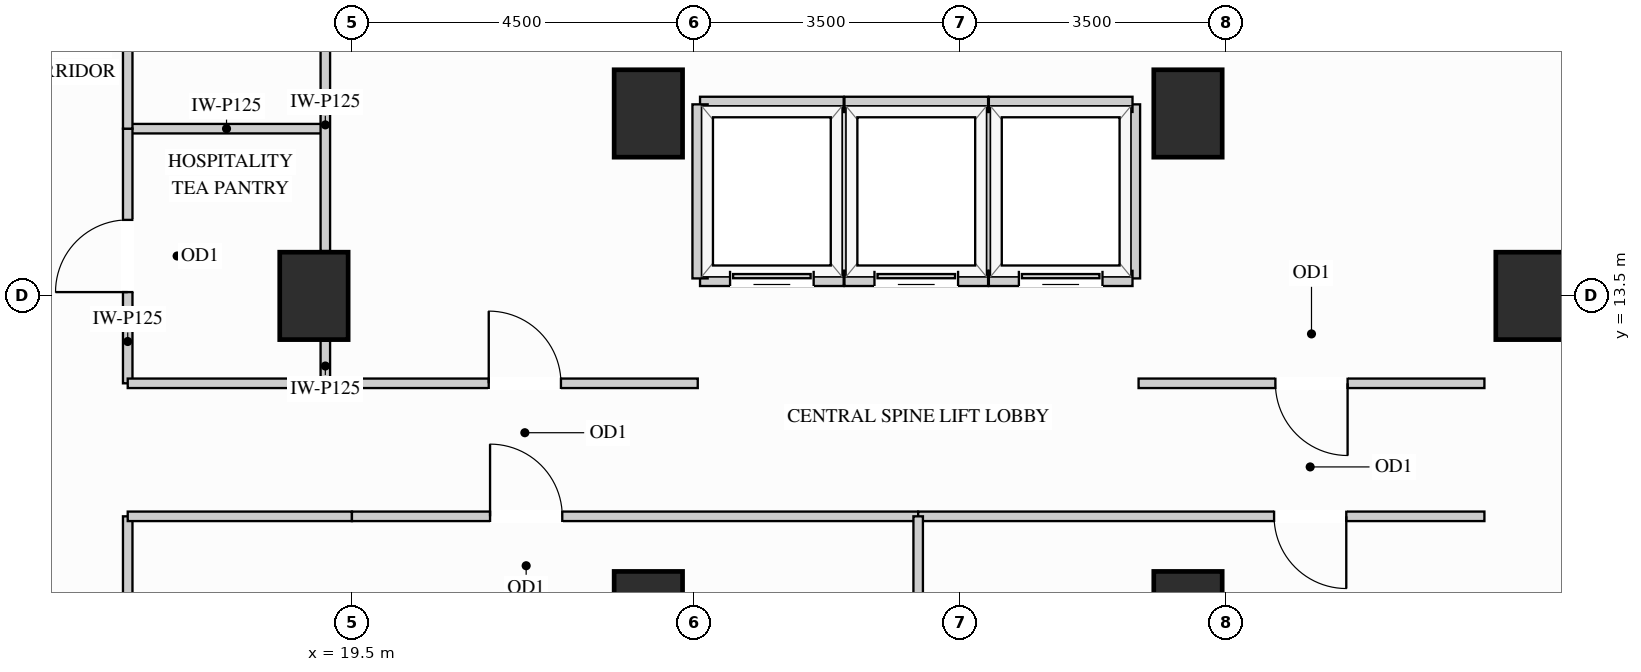
"""IFC4 building model, lengths in metres.
Left out: names, types, materials, properties, quantities, classifications, styles, units other than length and angle.
Written with IfcOpenShell. Run it as: python <this file> out.ifc"""

import sys

from ifc_helpers import new_model, si_unit, direction, frame, frame_2d, origin, origin_2d, place, context, subcontext, project, spatial, rectangle, extrude, source, transform, mapped, element, fill, save


model = new_model("IFC4")
c1 = context("Model", 3, precision=1e-05, world=origin(), true_north=direction((0.0, 1.0)))
c2 = subcontext(c1, "Body", "Model", "MODEL_VIEW")
j1 = project(units=[si_unit("LENGTHUNIT", "METRE"), si_unit("PLANEANGLEUNIT", "RADIAN")], contexts=[c1])
p1 = place(None, origin())
s1 = spatial("IfcSite", under=j1, at=p1, CompositionType="ELEMENT")
p2 = place(p1, origin())
s2 = spatial("IfcBuilding", under=s1, at=p2, CompositionType="ELEMENT")
p3 = place(p2, frame((0.0, 0.0, 99.0)))
s3 = spatial("IfcBuildingStorey", under=s2, at=p3, CompositionType="ELEMENT", Elevation=99.0)
m1 = source(origin(), c2, "Body", "SweptSolid", [
    extrude(rectangle(XDim=0.9, YDim=1.15, at=origin_2d()), origin(), (0.0, 0.0, 1.0), 3.38),
])
for number, where, z_axis, x_axis in (
    (1, (19.0, 13.5, 0.0), (0.0, 0.0, 1.0), (1.0, 0.0, 0.0)),
    (2, (35.0, 13.5, 0.0), (0.0, 0.0, 1.0), (1.0, 0.0, 0.0)),
    (3, (23.4, 15.9, 0.0), (0.0, 0.0, 1.0), (1.0, 0.0, 0.0)),
    (4, (23.4, 9.3, 0.0), (0.0, 0.0, 1.0), (1.0, 0.0, 0.0)),
    (5, (30.5, 15.9, 0.0), (0.0, 0.0, 1.0), (1.0, 0.0, 0.0)),
    (6, (30.5, 9.3, 0.0), (0.0, 0.0, 1.0), (1.0, 0.0, 0.0)),
):
    element("IfcColumn", number, at=place(p3, frame(where, z_axis=z_axis, x_axis=x_axis)), inside=s3, PredefinedType="COLUMN", context=c2, shape_type="MappedRepresentation", body=[
        mapped(m1, transform((0.0, 0.0, 0.0), x_axis=(1.0, 0.0, 0.0), y_axis=(0.0, 1.0, 0.0), z_axis=(0.0, 0.0, 1.0))),
    ])
m2 = source(origin(), c2, "Body", "SweptSolid", [
    extrude(rectangle(XDim=2.6, YDim=0.125, at=frame_2d((1.3, 0.0))), origin(), (0.0, 0.0, 1.0), 3.365),
])
p4 = place(p3, frame((16.55, 15.7, 0.0), z_axis=(0.0, 0.0, 1.0), x_axis=(1.0, 0.0, 0.0)))
e7 = element("IfcWall", 7, at=p4, inside=s3, PredefinedType="PARTITIONING", context=c2, shape_type="MappedRepresentation", body=[
    mapped(m2, transform((0.0, 0.0, 0.0), x_axis=(1.0, 0.0, 0.0), y_axis=(0.0, 1.0, 0.0), z_axis=(0.0, 0.0, 1.0))),
])
m3 = source(origin(), c2, "Body", "SweptSolid", [
    extrude(rectangle(XDim=0.56, YDim=0.125, at=frame_2d((0.28, 0.0))), origin(), (0.0, 0.0, 1.0), 2.677),
])
p5 = place(p3, frame((19.15, 12.35, 0.0), z_axis=(0.0, 0.0, 1.0), x_axis=(0.0, 1.0, 0.0)))
e8 = element("IfcWall", 8, at=p5, inside=s3, PredefinedType="PARTITIONING", context=c2, shape_type="MappedRepresentation", body=[
    mapped(m3, transform((0.0, 0.0, 0.0), x_axis=(1.0, 0.0, 0.0), y_axis=(0.0, 1.0, 0.0), z_axis=(0.0, 0.0, 1.0))),
])
m4 = source(origin(), c2, "Body", "SweptSolid", [
    extrude(rectangle(XDim=3.32, YDim=0.125, at=frame_2d((1.66, 0.0))), origin(), (0.0, 0.0, 1.0), 2.677),
])
p6 = place(p3, frame((19.15, 14.09, 0.0), z_axis=(0.0, 0.0, 1.0), x_axis=(0.0, 1.0, 0.0)))
e9 = element("IfcWall", 9, at=p6, inside=s3, PredefinedType="PARTITIONING", context=c2, shape_type="MappedRepresentation", body=[
    mapped(m4, transform((0.0, 0.0, 0.0), x_axis=(1.0, 0.0, 0.0), y_axis=(0.0, 1.0, 0.0), z_axis=(0.0, 0.0, 1.0))),
])
p7 = place(p3, frame((16.55, 12.35, 0.0), z_axis=(0.0, 0.0, 1.0), x_axis=(0.0, 1.0, 0.0)))
e10 = element("IfcWall", 10, at=p7, inside=s3, PredefinedType="PARTITIONING", context=c2, shape_type="SweptSolid", body=[
    extrude(rectangle(XDim=3.35, YDim=0.125, at=frame_2d((1.675, 0.0))), origin(), (0.0, 0.0, 1.0), 3.365),
])
p8 = place(p7, frame((1.2, 0.0, 0.0)))
e11 = element("IfcOpeningElement", 11, at=p8, cuts=e10, PredefinedType="OPENING", context=c2, shape_type="SweptSolid", body=[
    extrude(rectangle(XDim=0.95, YDim=2.15, at=frame_2d((0.475, 1.075))), frame((0.0, 0.073, 0.0), z_axis=(0.0, -1.0, 0.0), x_axis=(1.0, 0.0, 0.0)), (0.0, 0.0, 1.0), 0.145),
])
p9 = place(p3, frame((16.55, 15.7, 0.0), z_axis=(0.0, 0.0, 1.0), x_axis=(0.0, 1.0, 0.0)))
e12 = element("IfcWall", 12, at=p9, inside=s3, PredefinedType="PARTITIONING", context=c2, shape_type="SweptSolid", body=[
    extrude(rectangle(XDim=7.65, YDim=0.125, at=frame_2d((3.825, 0.0))), origin(), (0.0, 0.0, 1.0), 3.365),
])
p10 = place(p9, frame((3.35, 0.0, 0.0)))
e13 = element("IfcOpeningElement", 13, at=p10, cuts=e12, PredefinedType="OPENING", context=c2, shape_type="SweptSolid", body=[
    extrude(rectangle(XDim=0.95, YDim=2.15, at=frame_2d((0.475, 1.075))), frame((0.0, 0.073, 0.0), z_axis=(0.0, -1.0, 0.0), x_axis=(1.0, 0.0, 0.0)), (0.0, 0.0, 1.0), 0.145),
])
p11 = place(p3, frame((16.55, 4.7, 0.0), z_axis=(0.0, 0.0, 1.0), x_axis=(0.0, 1.0, 0.0)))
e14 = element("IfcWall", 14, at=p11, inside=s3, PredefinedType="PARTITIONING", context=c2, shape_type="SweptSolid", body=[
    extrude(rectangle(XDim=5.9, YDim=0.125, at=frame_2d((2.95, 0.0))), origin(), (0.0, 0.0, 1.0), 3.365),
])
p12 = place(p11, frame((2.475, 0.0, 0.0)))
e15 = element("IfcOpeningElement", 15, at=p12, cuts=e14, PredefinedType="OPENING", context=c2, shape_type="SweptSolid", body=[
    extrude(rectangle(XDim=0.95, YDim=2.15, at=frame_2d((0.475, 1.075))), frame((0.0, 0.073, 0.0), z_axis=(0.0, -1.0, 0.0), x_axis=(1.0, 0.0, 0.0)), (0.0, 0.0, 1.0), 0.145),
])
p13 = place(p3, frame((29.85, 12.35, 0.0), z_axis=(0.0, 0.0, 1.0), x_axis=(1.0, 0.0, 0.0)))
e16 = element("IfcWall", 16, at=p13, inside=s3, PredefinedType="PARTITIONING", context=c2, shape_type="SweptSolid", body=[
    extrude(rectangle(XDim=4.55, YDim=0.125, at=frame_2d((2.275, 0.0))), origin(), (0.0, 0.0, 1.0), 3.365),
])
p14 = place(p13, frame((1.8, 0.0, 0.0)))
e17 = element("IfcOpeningElement", 17, at=p14, cuts=e16, PredefinedType="OPENING", context=c2, shape_type="SweptSolid", body=[
    extrude(rectangle(XDim=0.95, YDim=2.15, at=frame_2d((0.475, 1.075))), frame((0.0, 0.073, 0.0), z_axis=(0.0, -1.0, 0.0), x_axis=(1.0, 0.0, 0.0)), (0.0, 0.0, 1.0), 0.145),
])
m5 = source(origin(), c2, "Body", "SweptSolid", [
    extrude(rectangle(XDim=2.95, YDim=0.125, at=frame_2d((1.475, 0.0))), origin(), (0.0, 0.0, 1.0), 3.365),
])
p15 = place(p3, frame((16.55, 12.35, 0.0), z_axis=(0.0, 0.0, 1.0), x_axis=(1.0, 0.0, 0.0)))
e18 = element("IfcWall", 18, at=p15, inside=s3, PredefinedType="PARTITIONING", context=c2, shape_type="MappedRepresentation", body=[
    mapped(m5, transform((0.0, 0.0, 0.0), x_axis=(1.0, 0.0, 0.0), y_axis=(0.0, 1.0, 0.0), z_axis=(0.0, 0.0, 1.0))),
])
p16 = place(p3, frame((19.5, 12.35, 0.0), z_axis=(0.0, 0.0, 1.0), x_axis=(1.0, 0.0, 0.0)))
e19 = element("IfcWall", 19, at=p16, inside=s3, PredefinedType="PARTITIONING", context=c2, shape_type="SweptSolid", body=[
    extrude(rectangle(XDim=4.55, YDim=0.125, at=frame_2d((2.275, 0.0))), origin(), (0.0, 0.0, 1.0), 3.365),
])
p17 = place(p16, frame((1.8, 0.0, 0.0)))
e20 = element("IfcOpeningElement", 20, at=p17, cuts=e19, PredefinedType="OPENING", context=c2, shape_type="SweptSolid", body=[
    extrude(rectangle(XDim=0.95, YDim=2.15, at=frame_2d((0.475, 1.075))), frame((0.0, 0.073, 0.0), z_axis=(0.0, -1.0, 0.0), x_axis=(1.0, 0.0, 0.0)), (0.0, 0.0, 1.0), 0.145),
])
p18 = place(p3, frame((16.55, 10.6, 0.0), z_axis=(0.0, 0.0, 1.0), x_axis=(1.0, 0.0, 0.0)))
e21 = element("IfcWall", 21, at=p18, inside=s3, PredefinedType="PARTITIONING", context=c2, shape_type="MappedRepresentation", body=[
    mapped(m5, transform((0.0, 0.0, 0.0), x_axis=(1.0, 0.0, 0.0), y_axis=(0.0, 1.0, 0.0), z_axis=(0.0, 0.0, 1.0))),
])
p19 = place(p3, frame((19.5, 10.6, 0.0), z_axis=(0.0, 0.0, 1.0), x_axis=(1.0, 0.0, 0.0)))
e22 = element("IfcWall", 22, at=p19, inside=s3, PredefinedType="PARTITIONING", context=c2, shape_type="SweptSolid", body=[
    extrude(rectangle(XDim=7.45, YDim=0.125, at=frame_2d((3.725, 0.0))), origin(), (0.0, 0.0, 1.0), 3.365),
])
p20 = place(p19, frame((1.817, 0.0, 0.0)))
e23 = element("IfcOpeningElement", 23, at=p20, cuts=e22, PredefinedType="OPENING", context=c2, shape_type="SweptSolid", body=[
    extrude(rectangle(XDim=0.95, YDim=2.15, at=frame_2d((0.475, 1.075))), frame((0.0, 0.073, 0.0), z_axis=(0.0, -1.0, 0.0), x_axis=(1.0, 0.0, 0.0)), (0.0, 0.0, 1.0), 0.145),
])
p21 = place(p3, frame((26.95, 10.6, 0.0), z_axis=(0.0, 0.0, 1.0), x_axis=(1.0, 0.0, 0.0)))
e24 = element("IfcWall", 24, at=p21, inside=s3, PredefinedType="PARTITIONING", context=c2, shape_type="SweptSolid", body=[
    extrude(rectangle(XDim=7.45, YDim=0.125, at=frame_2d((3.725, 0.0))), origin(), (0.0, 0.0, 1.0), 3.365),
])
p22 = place(p21, frame((4.683, 0.0, 0.0)))
e25 = element("IfcOpeningElement", 25, at=p22, cuts=e24, PredefinedType="OPENING", context=c2, shape_type="SweptSolid", body=[
    extrude(rectangle(XDim=0.95, YDim=2.15, at=frame_2d((0.475, 1.075))), frame((0.0, 0.073, 0.0), z_axis=(0.0, -1.0, 0.0), x_axis=(1.0, 0.0, 0.0)), (0.0, 0.0, 1.0), 0.145),
])
m6 = source(origin(), c2, "Body", "SweptSolid", [
    extrude(rectangle(XDim=1.748, YDim=0.125, at=frame_2d((0.874, 0.0))), origin(), (0.0, 0.0, 1.0), 3.365),
])
p23 = place(p3, frame((26.95, 8.852, 0.0), z_axis=(0.0, 0.0, 1.0), x_axis=(0.0, 1.0, 0.0)))
e26 = element("IfcWall", 26, at=p23, inside=s3, PredefinedType="PARTITIONING", context=c2, shape_type="MappedRepresentation", body=[
    mapped(m6, transform((0.0, 0.0, 0.0), x_axis=(1.0, 0.0, 0.0), y_axis=(0.0, 1.0, 0.0), z_axis=(0.0, 0.0, 1.0))),
])
m7 = source(origin(), c2, "Body", "SweptSolid", [
    extrude(rectangle(XDim=2.29, YDim=0.2, at=frame_2d((1.145, 0.0))), origin(), (0.0, 0.0, 1.0), 3.365),
])
p24 = place(p3, frame((25.97, 13.73, 0.0), z_axis=(0.0, 0.0, 1.0), x_axis=(0.0, 1.0, 0.0)))
e27 = element("IfcWall", 27, at=p24, inside=s3, PredefinedType="PARTITIONING", context=c2, shape_type="MappedRepresentation", body=[
    mapped(m7, transform((0.0, 0.0, 0.0), x_axis=(1.0, 0.0, 0.0), y_axis=(0.0, 1.0, 0.0), z_axis=(0.0, 0.0, 1.0))),
])
m8 = source(origin(), c2, "Body", "SweptSolid", [
    extrude(rectangle(XDim=1.89, YDim=0.2, at=frame_2d((0.945, 0.0))), origin(), (0.0, 0.0, 1.0), 2.677),
])
p25 = place(p3, frame((24.08, 16.02, 0.0), z_axis=(0.0, 0.0, 1.0), x_axis=(1.0, 0.0, 0.0)))
e28 = element("IfcWall", 28, at=p25, inside=s3, PredefinedType="PARTITIONING", context=c2, shape_type="MappedRepresentation", body=[
    mapped(m8, transform((0.0, 0.0, 0.0), x_axis=(1.0, 0.0, 0.0), y_axis=(0.0, 1.0, 0.0), z_axis=(0.0, 0.0, 1.0))),
])
p26 = place(p3, frame((24.08, 13.73, 0.0), z_axis=(0.0, 0.0, 1.0), x_axis=(1.0, 0.0, 0.0)))
e29 = element("IfcWall", 29, at=p26, inside=s3, PredefinedType="PARTITIONING", context=c2, shape_type="SweptSolid", body=[
    extrude(rectangle(XDim=1.89, YDim=0.2, at=frame_2d((0.945, 0.0))), origin(), (0.0, 0.0, 1.0), 2.446),
])
p27 = place(p26, frame((0.395, 0.0, 0.0)))
e30 = element("IfcOpeningElement", 30, at=p27, cuts=e29, PredefinedType="OPENING", context=c2, shape_type="SweptSolid", body=[
    extrude(rectangle(XDim=1.1, YDim=2.2, at=frame_2d((0.55, 1.1))), frame((0.0, 0.11, 0.0), z_axis=(0.0, -1.0, 0.0), x_axis=(1.0, 0.0, 0.0)), (0.0, 0.0, 1.0), 0.22),
])
for number, where, z_axis, x_axis in (
    (31, (24.08, 13.73, 0.0), (0.0, 0.0, 1.0), (0.0, 1.0, 0.0)),
    (32, (27.87, 13.73, 0.0), (0.0, 0.0, 1.0), (0.0, 1.0, 0.0)),
):
    element("IfcWall", number, at=place(p3, frame(where, z_axis=z_axis, x_axis=x_axis)), inside=s3, PredefinedType="PARTITIONING", context=c2, shape_type="MappedRepresentation", body=[
        mapped(m7, transform((0.0, 0.0, 0.0), x_axis=(1.0, 0.0, 0.0), y_axis=(0.0, 1.0, 0.0), z_axis=(0.0, 0.0, 1.0))),
    ])
m9 = source(origin(), c2, "Body", "SweptSolid", [
    extrude(rectangle(XDim=1.89, YDim=0.2, at=frame_2d((0.945, 0.0))), origin(), (0.0, 0.0, 1.0), 2.677),
])
p28 = place(p3, frame((25.98, 16.02, 0.0), z_axis=(0.0, 0.0, 1.0), x_axis=(1.0, 0.0, 0.0)))
e33 = element("IfcWall", 33, at=p28, inside=s3, PredefinedType="PARTITIONING", context=c2, shape_type="MappedRepresentation", body=[
    mapped(m9, transform((0.0, 0.0, 0.0), x_axis=(1.0, 0.0, 0.0), y_axis=(0.0, 1.0, 0.0), z_axis=(0.0, 0.0, 1.0))),
])
p29 = place(p3, frame((25.98, 13.73, 0.0), z_axis=(0.0, 0.0, 1.0), x_axis=(1.0, 0.0, 0.0)))
e34 = element("IfcWall", 34, at=p29, inside=s3, PredefinedType="PARTITIONING", context=c2, shape_type="SweptSolid", body=[
    extrude(rectangle(XDim=1.89, YDim=0.2, at=frame_2d((0.945, 0.0))), origin(), (0.0, 0.0, 1.0), 2.446),
])
p30 = place(p29, frame((0.395, 0.0, 0.0)))
e35 = element("IfcOpeningElement", 35, at=p30, cuts=e34, PredefinedType="OPENING", context=c2, shape_type="SweptSolid", body=[
    extrude(rectangle(XDim=1.1, YDim=2.2, at=frame_2d((0.55, 1.1))), frame((0.0, 0.11, 0.0), z_axis=(0.0, -1.0, 0.0), x_axis=(1.0, 0.0, 0.0)), (0.0, 0.0, 1.0), 0.22),
])
p31 = place(p3, frame((29.77, 13.73, 0.0), z_axis=(0.0, 0.0, 1.0), x_axis=(0.0, 1.0, 0.0)))
e36 = element("IfcWall", 36, at=p31, inside=s3, PredefinedType="PARTITIONING", context=c2, shape_type="MappedRepresentation", body=[
    mapped(m7, transform((0.0, 0.0, 0.0), x_axis=(1.0, 0.0, 0.0), y_axis=(0.0, 1.0, 0.0), z_axis=(0.0, 0.0, 1.0))),
])
p32 = place(p3, frame((27.88, 16.02, 0.0), z_axis=(0.0, 0.0, 1.0), x_axis=(1.0, 0.0, 0.0)))
e37 = element("IfcWall", 37, at=p32, inside=s3, PredefinedType="PARTITIONING", context=c2, shape_type="MappedRepresentation", body=[
    mapped(m9, transform((0.0, 0.0, 0.0), x_axis=(1.0, 0.0, 0.0), y_axis=(0.0, 1.0, 0.0), z_axis=(0.0, 0.0, 1.0))),
])
p33 = place(p3, frame((27.88, 13.73, 0.0), z_axis=(0.0, 0.0, 1.0), x_axis=(1.0, 0.0, 0.0)))
e38 = element("IfcWall", 38, at=p33, inside=s3, PredefinedType="PARTITIONING", context=c2, shape_type="SweptSolid", body=[
    extrude(rectangle(XDim=1.89, YDim=0.2, at=frame_2d((0.945, 0.0))), origin(), (0.0, 0.0, 1.0), 2.446),
])
p34 = place(p33, frame((0.395, 0.0, 0.0)))
e39 = element("IfcOpeningElement", 39, at=p34, cuts=e38, PredefinedType="OPENING", context=c2, shape_type="SweptSolid", body=[
    extrude(rectangle(XDim=1.1, YDim=2.2, at=frame_2d((0.55, 1.1))), frame((0.0, 0.11, 0.0), z_axis=(0.0, -1.0, 0.0), x_axis=(1.0, 0.0, 0.0)), (0.0, 0.0, 1.0), 0.22),
])
m10 = source(origin(), c2, "Body", "SweptSolid", [
    extrude(rectangle(XDim=1.1, YDim=2.2, at=frame_2d((0.55, 1.1))), frame((0.0, 0.025, 0.0), z_axis=(0.0, -1.0, 0.0), x_axis=(1.0, 0.0, 0.0)), (0.0, 0.0, 1.0), 0.05),
])
p35 = place(p27, origin())
e40 = element("IfcDoor", 40, at=p35, inside=s3, OperationType="SLIDING_TO_LEFT", PredefinedType="DOOR", context=c2, shape_type="MappedRepresentation", body=[
    mapped(m10, transform((0.0, 0.0, 0.0), x_axis=(1.0, 0.0, 0.0), y_axis=(0.0, 1.0, 0.0), z_axis=(0.0, 0.0, 1.0))),
])
fill(e30, e40)
p36 = place(p30, origin())
e41 = element("IfcDoor", 41, at=p36, inside=s3, OperationType="SLIDING_TO_LEFT", PredefinedType="DOOR", context=c2, shape_type="MappedRepresentation", body=[
    mapped(m10, transform((0.0, 0.0, 0.0), x_axis=(1.0, 0.0, 0.0), y_axis=(0.0, 1.0, 0.0), z_axis=(0.0, 0.0, 1.0))),
])
fill(e35, e41)
p37 = place(p34, origin())
e42 = element("IfcDoor", 42, at=p37, inside=s3, OperationType="SLIDING_TO_LEFT", PredefinedType="DOOR", context=c2, shape_type="MappedRepresentation", body=[
    mapped(m10, transform((0.0, 0.0, 0.0), x_axis=(1.0, 0.0, 0.0), y_axis=(0.0, 1.0, 0.0), z_axis=(0.0, 0.0, 1.0))),
])
fill(e39, e42)
m11 = source(origin(), c2, "Body", "SweptSolid", [
    extrude(rectangle(XDim=0.95, YDim=2.15, at=frame_2d((0.475, 1.075))), frame((0.0, 0.025, 0.0), z_axis=(0.0, -1.0, 0.0), x_axis=(1.0, 0.0, 0.0)), (0.0, 0.0, 1.0), 0.05),
])
p38 = place(p8, origin())
e43 = element("IfcDoor", 43, at=p38, inside=s3, OperationType="SINGLE_SWING_LEFT", PredefinedType="DOOR", context=c2, shape_type="MappedRepresentation", body=[
    mapped(m11, transform((0.0, 0.0, 0.0), x_axis=(1.0, 0.0, 0.0), y_axis=(0.0, 1.0, 0.0), z_axis=(0.0, 0.0, 1.0))),
])
fill(e11, e43)
p39 = place(p17, origin())
e44 = element("IfcDoor", 44, at=p39, inside=s3, OperationType="SINGLE_SWING_LEFT", PredefinedType="DOOR", context=c2, shape_type="MappedRepresentation", body=[
    mapped(m11, transform((0.0, 0.0, 0.0), x_axis=(1.0, 0.0, 0.0), y_axis=(0.0, 1.0, 0.0), z_axis=(0.0, 0.0, 1.0))),
])
fill(e20, e44)
p40 = place(p14, origin())
e45 = element("IfcDoor", 45, at=p40, inside=s3, OperationType="SINGLE_SWING_RIGHT", PredefinedType="DOOR", context=c2, shape_type="MappedRepresentation", body=[
    mapped(m11, transform((0.0, 0.0, 0.0), x_axis=(1.0, 0.0, 0.0), y_axis=(0.0, 1.0, 0.0), z_axis=(0.0, 0.0, 1.0))),
])
fill(e17, e45)
p41 = place(p20, origin())
e46 = element("IfcDoor", 46, at=p41, inside=s3, OperationType="SINGLE_SWING_LEFT", PredefinedType="DOOR", context=c2, shape_type="MappedRepresentation", body=[
    mapped(m11, transform((0.0, 0.0, 0.0), x_axis=(1.0, 0.0, 0.0), y_axis=(0.0, 1.0, 0.0), z_axis=(0.0, 0.0, 1.0))),
])
fill(e23, e46)
p42 = place(p22, origin())
e47 = element("IfcDoor", 47, at=p42, inside=s3, OperationType="SINGLE_SWING_RIGHT", PredefinedType="DOOR", context=c2, shape_type="MappedRepresentation", body=[
    mapped(m11, transform((0.0, 0.0, 0.0), x_axis=(1.0, 0.0, 0.0), y_axis=(0.0, 1.0, 0.0), z_axis=(0.0, 0.0, 1.0))),
])
fill(e25, e47)
save(model, sys.argv[1])
